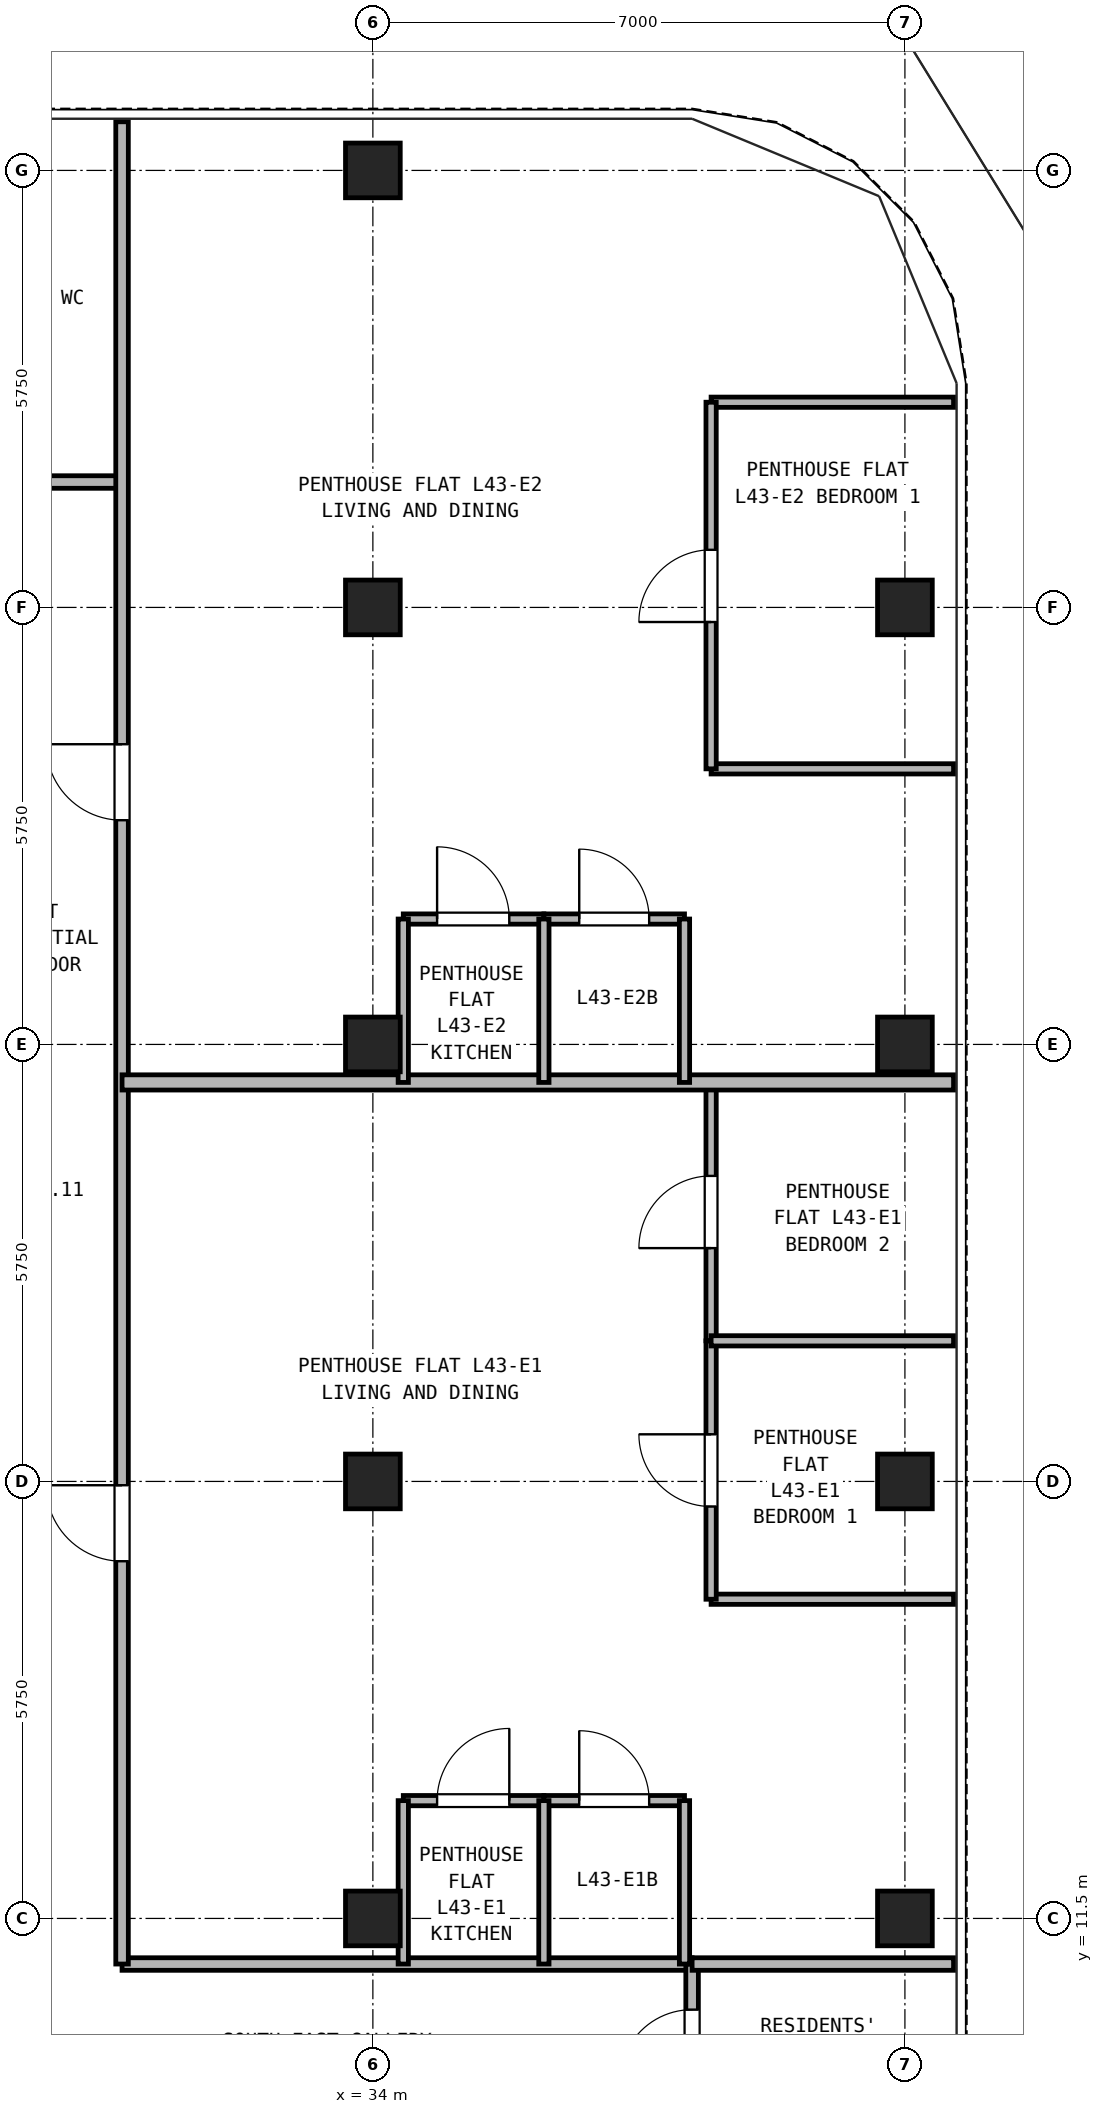
"""IFC4 building model, lengths in metres.
Left out: names, types, materials, properties, quantities, classifications, styles, units other than length and angle.
Written with IfcOpenShell. Run it as: python <this file> out.ifc"""

import sys

from ifc_helpers import new_model, si_unit, direction, frame, frame_2d, origin, origin_2d, place, context, subcontext, project, spatial, rectangle, hollow_rectangle, extrude, source, transform, mapped, element, fill, save


model = new_model("IFC4")
c1 = context("Model", 3, precision=1e-05, world=origin(), true_north=direction((0.0, 1.0)))
c2 = subcontext(c1, "Body", "Model", "MODEL_VIEW")
j1 = project(units=[si_unit("LENGTHUNIT", "METRE"), si_unit("PLANEANGLEUNIT", "RADIAN")], contexts=[c1])
p1 = place(None, origin())
s1 = spatial("IfcSite", under=j1, at=p1, CompositionType="ELEMENT")
p2 = place(p1, origin())
s2 = spatial("IfcBuilding", under=s1, at=p2, CompositionType="ELEMENT")
p3 = place(p2, frame((0.0, 0.0, 156.1)))
s3 = spatial("IfcBuildingStorey", under=s2, at=p3, CompositionType="ELEMENT", Elevation=156.1)
m1 = source(origin(), c2, "Body", "SweptSolid", [
    extrude(hollow_rectangle(XDim=0.72, YDim=0.72, WallThickness=0.04, at=origin_2d()), origin(), (0.0, 0.0, 1.0), 2.95),
])
for number, where, z_axis, x_axis in (
    (1, (34.0, 34.5, 0.0), (0.0, 0.0, 1.0), (1.0, 0.0, 0.0)),
    (2, (41.0, 11.5, 0.0), (0.0, 0.0, 1.0), (1.0, 0.0, 0.0)),
    (3, (41.0, 17.25, 0.0), (0.0, 0.0, 1.0), (1.0, 0.0, 0.0)),
    (4, (41.0, 23.0, 0.0), (0.0, 0.0, 1.0), (1.0, 0.0, 0.0)),
    (5, (41.0, 28.75, 0.0), (0.0, 0.0, 1.0), (1.0, 0.0, 0.0)),
    (6, (34.0, 11.5, 0.0), (0.0, 0.0, 1.0), (1.0, 0.0, 0.0)),
    (7, (34.0, 17.25, 0.0), (0.0, 0.0, 1.0), (1.0, 0.0, 0.0)),
    (8, (34.0, 23.0, 0.0), (0.0, 0.0, 1.0), (1.0, 0.0, 0.0)),
    (9, (34.0, 28.75, 0.0), (0.0, 0.0, 1.0), (1.0, 0.0, 0.0)),
):
    element("IfcColumn", number, at=place(p3, frame(where, z_axis=z_axis, x_axis=x_axis)), inside=s3, PredefinedType="COLUMN", context=c2, shape_type="MappedRepresentation", body=[
        mapped(m1, transform((0.0, 0.0, 0.0), x_axis=(1.0, 0.0, 0.0), y_axis=(0.0, 1.0, 0.0), z_axis=(0.0, 0.0, 1.0), scale=1.0)),
    ])
p4 = place(p3, frame((30.7, 10.9, 0.0), z_axis=(0.0, 0.0, 1.0), x_axis=(1.0, 0.0, 0.0)))
e10 = element("IfcWall", 10, at=p4, inside=s3, PredefinedType="PARTITIONING", context=c2, shape_type="SweptSolid", body=[
    extrude(rectangle(XDim=7.5, YDim=0.165, at=frame_2d((3.75, 0.0))), origin(), (0.0, 0.0, 1.0), 2.95),
])
p5 = place(p3, frame((38.2, 8.9, 0.0), z_axis=(0.0, 0.0, 1.0), x_axis=(0.0, 1.0, 0.0)))
e11 = element("IfcWall", 11, at=p5, inside=s3, PredefinedType="PARTITIONING", context=c2, shape_type="SweptSolid", body=[
    extrude(rectangle(XDim=2.0, YDim=0.165, at=frame_2d((1.0, 0.0))), origin(), (0.0, 0.0, 1.0), 2.95),
])
p6 = place(p5, frame((0.45, 0.0, 0.0)))
e12 = element("IfcOpeningElement", 12, at=p6, cuts=e11, PredefinedType="OPENING", context=c2, shape_type="SweptSolid", body=[
    extrude(rectangle(XDim=0.95, YDim=2.15, at=frame_2d((0.475, 1.075))), frame((0.0, 0.093, 0.0), z_axis=(0.0, -1.0, 0.0), x_axis=(1.0, 0.0, 0.0)), (0.0, 0.0, 1.0), 0.185),
])
p7 = place(p3, frame((16.3, 30.4, 0.0), z_axis=(0.0, 0.0, 1.0), x_axis=(1.0, 0.0, 0.0)))
e13 = element("IfcWall", 13, at=p7, inside=s3, PredefinedType="PARTITIONING", context=c2, shape_type="SweptSolid", body=[
    extrude(rectangle(XDim=14.4, YDim=0.165, at=frame_2d((7.2, 0.0))), origin(), (0.0, 0.0, 1.0), 2.95),
])
p8 = place(p7, frame((2.35, 0.0, 0.0)))
e14 = element("IfcOpeningElement", 14, at=p8, cuts=e13, PredefinedType="OPENING", context=c2, shape_type="SweptSolid", body=[
    extrude(rectangle(XDim=0.95, YDim=2.15, at=frame_2d((0.475, 1.075))), frame((0.0, 0.093, 0.0), z_axis=(0.0, -1.0, 0.0), x_axis=(1.0, 0.0, 0.0)), (0.0, 0.0, 1.0), 0.185),
])
p9 = place(p7, frame((7.25, 0.0, 0.0)))
e15 = element("IfcOpeningElement", 15, at=p9, cuts=e13, PredefinedType="OPENING", context=c2, shape_type="SweptSolid", body=[
    extrude(rectangle(XDim=0.95, YDim=2.15, at=frame_2d((0.475, 1.075))), frame((0.0, 0.093, 0.0), z_axis=(0.0, -1.0, 0.0), x_axis=(1.0, 0.0, 0.0)), (0.0, 0.0, 1.0), 0.185),
])
p10 = place(p7, frame((11.6, 0.0, 0.0)))
e16 = element("IfcOpeningElement", 16, at=p10, cuts=e13, PredefinedType="OPENING", context=c2, shape_type="SweptSolid", body=[
    extrude(rectangle(XDim=0.92, YDim=2.1, at=frame_2d((0.46, 1.05))), frame((0.0, 0.093, 0.0), z_axis=(0.0, -1.0, 0.0), x_axis=(1.0, 0.0, 0.0)), (0.0, 0.0, 1.0), 0.185),
])
p11 = place(p3, frame((30.7, 10.9, 0.0), z_axis=(0.0, 0.0, 1.0), x_axis=(0.0, 1.0, 0.0)))
e17 = element("IfcWall", 17, at=p11, inside=s3, PredefinedType="PARTITIONING", context=c2, shape_type="SweptSolid", body=[
    extrude(rectangle(XDim=24.24, YDim=0.165, at=frame_2d((12.12, 0.0))), origin(), (0.0, 0.0, 1.0), 2.95),
])
p12 = place(p11, frame((5.3, 0.0, 0.0)))
e18 = element("IfcOpeningElement", 18, at=p12, cuts=e17, PredefinedType="OPENING", context=c2, shape_type="SweptSolid", body=[
    extrude(rectangle(XDim=1.0, YDim=2.15, at=frame_2d((0.5, 1.075))), frame((0.0, 0.093, 0.0), z_axis=(0.0, -1.0, 0.0), x_axis=(1.0, 0.0, 0.0)), (0.0, 0.0, 1.0), 0.185),
])
p13 = place(p11, frame((15.05, 0.0, 0.0)))
e19 = element("IfcOpeningElement", 19, at=p13, cuts=e17, PredefinedType="OPENING", context=c2, shape_type="SweptSolid", body=[
    extrude(rectangle(XDim=1.0, YDim=2.15, at=frame_2d((0.5, 1.075))), frame((0.0, 0.093, 0.0), z_axis=(0.0, -1.0, 0.0), x_axis=(1.0, 0.0, 0.0)), (0.0, 0.0, 1.0), 0.185),
])
p14 = place(p3, frame((38.2, 10.9, 0.0), z_axis=(0.0, 0.0, 1.0), x_axis=(1.0, 0.0, 0.0)))
e20 = element("IfcWall", 20, at=p14, inside=s3, PredefinedType="PARTITIONING", context=c2, shape_type="SweptSolid", body=[
    extrude(rectangle(XDim=3.44, YDim=0.165, at=frame_2d((1.72, 0.0))), origin(), (0.0, 0.0, 1.0), 2.95),
])
p15 = place(p3, frame((34.4, 13.05, 0.0), z_axis=(0.0, 0.0, 1.0), x_axis=(1.0, 0.0, 0.0)))
e21 = element("IfcWall", 21, at=p15, inside=s3, PredefinedType="PARTITIONING", context=c2, shape_type="SweptSolid", body=[
    extrude(rectangle(XDim=1.85, YDim=0.135, at=frame_2d((0.925, 0.0))), origin(), (0.0, 0.0, 1.0), 2.95),
])
p16 = place(p15, frame((0.445, 0.0, 0.0)))
e22 = element("IfcOpeningElement", 22, at=p16, cuts=e21, PredefinedType="OPENING", context=c2, shape_type="SweptSolid", body=[
    extrude(rectangle(XDim=0.95, YDim=2.15, at=frame_2d((0.475, 1.075))), frame((0.0, 0.077, 0.0), z_axis=(0.0, -1.0, 0.0), x_axis=(1.0, 0.0, 0.0)), (0.0, 0.0, 1.0), 0.155),
])
p17 = place(p3, frame((36.25, 13.05, 0.0), z_axis=(0.0, 0.0, 1.0), x_axis=(1.0, 0.0, 0.0)))
e23 = element("IfcWall", 23, at=p17, inside=s3, PredefinedType="PARTITIONING", context=c2, shape_type="SweptSolid", body=[
    extrude(rectangle(XDim=1.85, YDim=0.135, at=frame_2d((0.925, 0.0))), origin(), (0.0, 0.0, 1.0), 2.95),
])
p18 = place(p17, frame((0.465, 0.0, 0.0)))
e24 = element("IfcOpeningElement", 24, at=p18, cuts=e23, PredefinedType="OPENING", context=c2, shape_type="SweptSolid", body=[
    extrude(rectangle(XDim=0.92, YDim=2.1, at=frame_2d((0.46, 1.05))), frame((0.0, 0.077, 0.0), z_axis=(0.0, -1.0, 0.0), x_axis=(1.0, 0.0, 0.0)), (0.0, 0.0, 1.0), 0.155),
])
for number, where, z_axis, x_axis in (
    (25, (34.4, 10.9, 0.0), (0.0, 0.0, 1.0), (0.0, 1.0, 0.0)),
    (26, (36.25, 10.9, 0.0), (0.0, 0.0, 1.0), (0.0, 1.0, 0.0)),
    (27, (38.1, 10.9, 0.0), (0.0, 0.0, 1.0), (0.0, 1.0, 0.0)),
):
    element("IfcWall", number, at=place(p3, frame(where, z_axis=z_axis, x_axis=x_axis)), inside=s3, PredefinedType="PARTITIONING", context=c2, shape_type="SweptSolid", body=[
        extrude(rectangle(XDim=2.15, YDim=0.135, at=frame_2d((1.075, 0.0))), origin(), (0.0, 0.0, 1.0), 2.95),
    ])
p19 = place(p3, frame((38.45, 15.7, 0.0), z_axis=(0.0, 0.0, 1.0), x_axis=(1.0, 0.0, 0.0)))
e28 = element("IfcWall", 28, at=p19, inside=s3, PredefinedType="PARTITIONING", context=c2, shape_type="SweptSolid", body=[
    extrude(rectangle(XDim=3.19, YDim=0.135, at=frame_2d((1.595, 0.0))), origin(), (0.0, 0.0, 1.0), 2.95),
])
p20 = place(p3, frame((38.45, 15.7, 0.0), z_axis=(0.0, 0.0, 1.0), x_axis=(0.0, 1.0, 0.0)))
e29 = element("IfcWall", 29, at=p20, inside=s3, PredefinedType="PARTITIONING", context=c2, shape_type="SweptSolid", body=[
    extrude(rectangle(XDim=3.4, YDim=0.135, at=frame_2d((1.7, 0.0))), origin(), (0.0, 0.0, 1.0), 2.95),
])
p21 = place(p20, frame((1.22, 0.0, 0.0)))
e30 = element("IfcOpeningElement", 30, at=p21, cuts=e29, PredefinedType="OPENING", context=c2, shape_type="SweptSolid", body=[
    extrude(rectangle(XDim=0.95, YDim=2.15, at=frame_2d((0.475, 1.075))), frame((0.0, 0.077, 0.0), z_axis=(0.0, -1.0, 0.0), x_axis=(1.0, 0.0, 0.0)), (0.0, 0.0, 1.0), 0.155),
])
p22 = place(p3, frame((38.45, 19.1, 0.0), z_axis=(0.0, 0.0, 1.0), x_axis=(0.0, 1.0, 0.0)))
e31 = element("IfcWall", 31, at=p22, inside=s3, PredefinedType="PARTITIONING", context=c2, shape_type="SweptSolid", body=[
    extrude(rectangle(XDim=3.4, YDim=0.135, at=frame_2d((1.7, 0.0))), origin(), (0.0, 0.0, 1.0), 2.95),
])
p23 = place(p22, frame((1.22, 0.0, 0.0)))
e32 = element("IfcOpeningElement", 32, at=p23, cuts=e31, PredefinedType="OPENING", context=c2, shape_type="SweptSolid", body=[
    extrude(rectangle(XDim=0.95, YDim=2.15, at=frame_2d((0.475, 1.075))), frame((0.0, 0.077, 0.0), z_axis=(0.0, -1.0, 0.0), x_axis=(1.0, 0.0, 0.0)), (0.0, 0.0, 1.0), 0.155),
])
p24 = place(p3, frame((38.45, 19.1, 0.0), z_axis=(0.0, 0.0, 1.0), x_axis=(1.0, 0.0, 0.0)))
e33 = element("IfcWall", 33, at=p24, inside=s3, PredefinedType="PARTITIONING", context=c2, shape_type="SweptSolid", body=[
    extrude(rectangle(XDim=3.19, YDim=0.135, at=frame_2d((1.595, 0.0))), origin(), (0.0, 0.0, 1.0), 2.95),
])
p25 = place(p3, frame((30.7, 22.5, 0.0), z_axis=(0.0, 0.0, 1.0), x_axis=(1.0, 0.0, 0.0)))
e34 = element("IfcWall", 34, at=p25, inside=s3, PredefinedType="PARTITIONING", context=c2, shape_type="SweptSolid", body=[
    extrude(rectangle(XDim=10.94, YDim=0.2, at=frame_2d((5.47, 0.0))), origin(), (0.0, 0.0, 1.0), 2.95),
])
p26 = place(p3, frame((34.4, 24.65, 0.0), z_axis=(0.0, 0.0, 1.0), x_axis=(1.0, 0.0, 0.0)))
e35 = element("IfcWall", 35, at=p26, inside=s3, PredefinedType="PARTITIONING", context=c2, shape_type="SweptSolid", body=[
    extrude(rectangle(XDim=1.85, YDim=0.135, at=frame_2d((0.925, 0.0))), origin(), (0.0, 0.0, 1.0), 2.95),
])
p27 = place(p26, frame((0.445, 0.0, 0.0)))
e36 = element("IfcOpeningElement", 36, at=p27, cuts=e35, PredefinedType="OPENING", context=c2, shape_type="SweptSolid", body=[
    extrude(rectangle(XDim=0.95, YDim=2.15, at=frame_2d((0.475, 1.075))), frame((0.0, 0.077, 0.0), z_axis=(0.0, -1.0, 0.0), x_axis=(1.0, 0.0, 0.0)), (0.0, 0.0, 1.0), 0.155),
])
p28 = place(p3, frame((36.25, 24.65, 0.0), z_axis=(0.0, 0.0, 1.0), x_axis=(1.0, 0.0, 0.0)))
e37 = element("IfcWall", 37, at=p28, inside=s3, PredefinedType="PARTITIONING", context=c2, shape_type="SweptSolid", body=[
    extrude(rectangle(XDim=1.85, YDim=0.135, at=frame_2d((0.925, 0.0))), origin(), (0.0, 0.0, 1.0), 2.95),
])
p29 = place(p28, frame((0.465, 0.0, 0.0)))
e38 = element("IfcOpeningElement", 38, at=p29, cuts=e37, PredefinedType="OPENING", context=c2, shape_type="SweptSolid", body=[
    extrude(rectangle(XDim=0.92, YDim=2.1, at=frame_2d((0.46, 1.05))), frame((0.0, 0.077, 0.0), z_axis=(0.0, -1.0, 0.0), x_axis=(1.0, 0.0, 0.0)), (0.0, 0.0, 1.0), 0.155),
])
for number, where, z_axis, x_axis in (
    (39, (34.4, 22.5, 0.0), (0.0, 0.0, 1.0), (0.0, 1.0, 0.0)),
    (40, (36.25, 22.5, 0.0), (0.0, 0.0, 1.0), (0.0, 1.0, 0.0)),
    (41, (38.1, 22.5, 0.0), (0.0, 0.0, 1.0), (0.0, 1.0, 0.0)),
):
    element("IfcWall", number, at=place(p3, frame(where, z_axis=z_axis, x_axis=x_axis)), inside=s3, PredefinedType="PARTITIONING", context=c2, shape_type="SweptSolid", body=[
        extrude(rectangle(XDim=2.15, YDim=0.135, at=frame_2d((1.075, 0.0))), origin(), (0.0, 0.0, 1.0), 2.95),
    ])
for number, where, z_axis, x_axis in (
    (42, (38.45, 26.626, 0.0), (0.0, 0.0, 1.0), (1.0, 0.0, 0.0)),
    (43, (38.45, 31.45, 0.0), (0.0, 0.0, 1.0), (1.0, 0.0, 0.0)),
):
    element("IfcWall", number, at=place(p3, frame(where, z_axis=z_axis, x_axis=x_axis)), inside=s3, PredefinedType="PARTITIONING", context=c2, shape_type="SweptSolid", body=[
        extrude(rectangle(XDim=3.19, YDim=0.135, at=frame_2d((1.595, 0.0))), origin(), (0.0, 0.0, 1.0), 2.95),
    ])
p30 = place(p3, frame((38.45, 26.626, 0.0), z_axis=(0.0, 0.0, 1.0), x_axis=(0.0, 1.0, 0.0)))
e44 = element("IfcWall", 44, at=p30, inside=s3, PredefinedType="PARTITIONING", context=c2, shape_type="SweptSolid", body=[
    extrude(rectangle(XDim=4.824, YDim=0.135, at=frame_2d((2.412, 0.0))), origin(), (0.0, 0.0, 1.0), 2.95),
])
p31 = place(p30, frame((1.932, 0.0, 0.0)))
e45 = element("IfcOpeningElement", 45, at=p31, cuts=e44, PredefinedType="OPENING", context=c2, shape_type="SweptSolid", body=[
    extrude(rectangle(XDim=0.95, YDim=2.15, at=frame_2d((0.475, 1.075))), frame((0.0, 0.077, 0.0), z_axis=(0.0, -1.0, 0.0), x_axis=(1.0, 0.0, 0.0)), (0.0, 0.0, 1.0), 0.155),
])
p32 = place(p6, origin())
e46 = element("IfcDoor", 46, at=p32, inside=s3, OperationType="SINGLE_SWING_LEFT", PredefinedType="DOOR", context=c2, shape_type="SweptSolid", body=[
    extrude(rectangle(XDim=0.95, YDim=2.15, at=frame_2d((0.475, 1.075))), frame((0.0, 0.025, 0.0), z_axis=(0.0, -1.0, 0.0), x_axis=(1.0, 0.0, 0.0)), (0.0, 0.0, 1.0), 0.05),
])
fill(e12, e46)
p33 = place(p16, origin())
e47 = element("IfcDoor", 47, at=p33, inside=s3, OperationType="SINGLE_SWING_RIGHT", PredefinedType="DOOR", context=c2, shape_type="SweptSolid", body=[
    extrude(rectangle(XDim=0.95, YDim=2.15, at=frame_2d((0.475, 1.075))), frame((0.0, 0.025, 0.0), z_axis=(0.0, -1.0, 0.0), x_axis=(1.0, 0.0, 0.0)), (0.0, 0.0, 1.0), 0.05),
])
fill(e22, e47)
p34 = place(p18, origin())
e48 = element("IfcDoor", 48, at=p34, inside=s3, OperationType="SINGLE_SWING_LEFT", PredefinedType="DOOR", context=c2, shape_type="SweptSolid", body=[
    extrude(rectangle(XDim=0.92, YDim=2.1, at=frame_2d((0.46, 1.05))), frame((0.0, 0.025, 0.0), z_axis=(0.0, -1.0, 0.0), x_axis=(1.0, 0.0, 0.0)), (0.0, 0.0, 1.0), 0.05),
])
fill(e24, e48)
p35 = place(p21, frame((0.95, 0.0, 0.0), z_axis=(0.0, 0.0, 1.0), x_axis=(-1.0, 0.0, 0.0)))
e49 = element("IfcDoor", 49, at=p35, inside=s3, OperationType="SINGLE_SWING_RIGHT", PredefinedType="DOOR", context=c2, shape_type="SweptSolid", body=[
    extrude(rectangle(XDim=0.95, YDim=2.15, at=frame_2d((0.475, 1.075))), frame((0.0, 0.025, 0.0), z_axis=(0.0, -1.0, 0.0), x_axis=(1.0, 0.0, 0.0)), (0.0, 0.0, 1.0), 0.05),
])
fill(e30, e49)
p36 = place(p23, frame((0.95, 0.0, 0.0), z_axis=(0.0, 0.0, 1.0), x_axis=(-1.0, 0.0, 0.0)))
e50 = element("IfcDoor", 50, at=p36, inside=s3, OperationType="SINGLE_SWING_LEFT", PredefinedType="DOOR", context=c2, shape_type="SweptSolid", body=[
    extrude(rectangle(XDim=0.95, YDim=2.15, at=frame_2d((0.475, 1.075))), frame((0.0, 0.025, 0.0), z_axis=(0.0, -1.0, 0.0), x_axis=(1.0, 0.0, 0.0)), (0.0, 0.0, 1.0), 0.05),
])
fill(e32, e50)
p37 = place(p12, frame((1.0, 0.0, 0.0), z_axis=(0.0, 0.0, 1.0), x_axis=(-1.0, 0.0, 0.0)))
e51 = element("IfcDoor", 51, at=p37, inside=s3, OperationType="SINGLE_SWING_RIGHT", PredefinedType="DOOR", context=c2, shape_type="SweptSolid", body=[
    extrude(rectangle(XDim=1.0, YDim=2.15, at=frame_2d((0.5, 1.075))), frame((0.0, 0.025, 0.0), z_axis=(0.0, -1.0, 0.0), x_axis=(1.0, 0.0, 0.0)), (0.0, 0.0, 1.0), 0.05),
])
fill(e18, e51)
p38 = place(p27, origin())
e52 = element("IfcDoor", 52, at=p38, inside=s3, OperationType="SINGLE_SWING_LEFT", PredefinedType="DOOR", context=c2, shape_type="SweptSolid", body=[
    extrude(rectangle(XDim=0.95, YDim=2.15, at=frame_2d((0.475, 1.075))), frame((0.0, 0.025, 0.0), z_axis=(0.0, -1.0, 0.0), x_axis=(1.0, 0.0, 0.0)), (0.0, 0.0, 1.0), 0.05),
])
fill(e36, e52)
p39 = place(p29, origin())
e53 = element("IfcDoor", 53, at=p39, inside=s3, OperationType="SINGLE_SWING_LEFT", PredefinedType="DOOR", context=c2, shape_type="SweptSolid", body=[
    extrude(rectangle(XDim=0.92, YDim=2.1, at=frame_2d((0.46, 1.05))), frame((0.0, 0.025, 0.0), z_axis=(0.0, -1.0, 0.0), x_axis=(1.0, 0.0, 0.0)), (0.0, 0.0, 1.0), 0.05),
])
fill(e38, e53)
p40 = place(p31, frame((0.95, 0.0, 0.0), z_axis=(0.0, 0.0, 1.0), x_axis=(-1.0, 0.0, 0.0)))
e54 = element("IfcDoor", 54, at=p40, inside=s3, OperationType="SINGLE_SWING_LEFT", PredefinedType="DOOR", context=c2, shape_type="SweptSolid", body=[
    extrude(rectangle(XDim=0.95, YDim=2.15, at=frame_2d((0.475, 1.075))), frame((0.0, 0.025, 0.0), z_axis=(0.0, -1.0, 0.0), x_axis=(1.0, 0.0, 0.0)), (0.0, 0.0, 1.0), 0.05),
])
fill(e45, e54)
p41 = place(p13, frame((1.0, 0.0, 0.0), z_axis=(0.0, 0.0, 1.0), x_axis=(-1.0, 0.0, 0.0)))
e55 = element("IfcDoor", 55, at=p41, inside=s3, OperationType="SINGLE_SWING_RIGHT", PredefinedType="DOOR", context=c2, shape_type="SweptSolid", body=[
    extrude(rectangle(XDim=1.0, YDim=2.15, at=frame_2d((0.5, 1.075))), frame((0.0, 0.025, 0.0), z_axis=(0.0, -1.0, 0.0), x_axis=(1.0, 0.0, 0.0)), (0.0, 0.0, 1.0), 0.05),
])
fill(e19, e55)
save(model, sys.argv[1])
